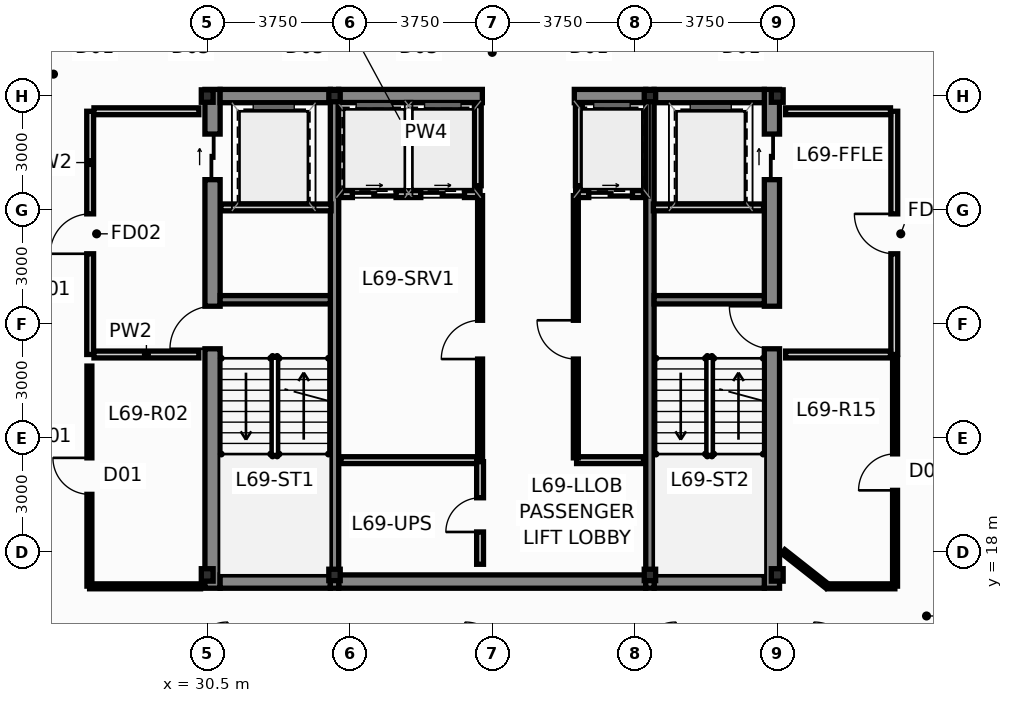
"""IFC4 building model, lengths in metres.
Left out: names, types, materials, properties, quantities, classifications, styles, units other than length and angle.
Written with IfcOpenShell. Run it as: python <this file> out.ifc"""

import sys

from ifc_helpers import new_model, si_unit, direction, frame, frame_2d, origin, origin_2d, place, context, subcontext, project, spatial, rectangle, hollow_rectangle, i_section, extrude, source, transform, mapped, element, fill, save


model = new_model("IFC4")
c1 = context("Model", 3, precision=1e-05, world=origin(), true_north=direction((0.0, 1.0)))
c2 = subcontext(c1, "Body", "Model", "MODEL_VIEW")
j1 = project(units=[si_unit("LENGTHUNIT", "METRE"), si_unit("PLANEANGLEUNIT", "RADIAN")], contexts=[c1])
p1 = place(None, origin())
s1 = spatial("IfcSite", under=j1, at=p1, CompositionType="ELEMENT")
p2 = place(p1, origin())
s2 = spatial("IfcBuilding", under=s1, at=p2, CompositionType="ELEMENT")
p3 = place(p2, frame((0.0, 0.0, 262.7)))
s3 = spatial("IfcBuildingStorey", under=s2, at=p3, CompositionType="ELEMENT", Elevation=262.7)
m1 = source(origin(), c2, "Body", "SweptSolid", [
    extrude(i_section(OverallWidth=0.311, OverallDepth=0.327, WebThickness=0.016, FlangeThickness=0.025, at=origin_2d()), origin(), (0.0, 0.0, 1.0), 3.65),
])
for number, where, z_axis, x_axis in (
    (1, (30.5, 17.4, 0.0), (0.0, 0.0, 1.0), (1.0, 0.0, 0.0)),
    (2, (45.5, 17.4, 0.0), (0.0, 0.0, 1.0), (1.0, 0.0, 0.0)),
    (3, (45.5, 30.0, 0.0), (0.0, 0.0, 1.0), (1.0, 0.0, 0.0)),
    (4, (30.5, 30.0, 0.0), (0.0, 0.0, 1.0), (1.0, 0.0, 0.0)),
):
    element("IfcColumn", number, at=place(p3, frame(where, z_axis=z_axis, x_axis=x_axis)), inside=s3, PredefinedType="COLUMN", context=c2, shape_type="MappedRepresentation", body=[
        mapped(m1, transform((0.0, 0.0, 0.0), scale=1.0)),
    ])
m2 = source(origin(), c2, "Body", "SweptSolid", [
    extrude(hollow_rectangle(XDim=0.3, YDim=0.3, WallThickness=0.012, at=origin_2d()), origin(), (0.0, 0.0, 1.0), 3.65),
])
for number, where, z_axis, x_axis in (
    (5, (33.85, 17.4, 0.0), (0.0, 0.0, 1.0), (1.0, 0.0, 0.0)),
    (6, (42.15, 17.4, 0.0), (0.0, 0.0, 1.0), (1.0, 0.0, 0.0)),
    (7, (33.85, 30.0, 0.0), (0.0, 0.0, 1.0), (1.0, 0.0, 0.0)),
    (8, (42.15, 30.0, 0.0), (0.0, 0.0, 1.0), (1.0, 0.0, 0.0)),
):
    element("IfcColumn", number, at=place(p3, frame(where, z_axis=z_axis, x_axis=x_axis)), inside=s3, PredefinedType="COLUMN", context=c2, shape_type="MappedRepresentation", body=[
        mapped(m2, transform((0.0, 0.0, 0.0), scale=1.0)),
    ])
p4 = place(p3, frame((30.64, 17.05, 0.0), z_axis=(0.0, 0.0, 1.0), x_axis=(0.0, 1.0, 0.0)))
e9 = element("IfcWall", 9, at=p4, inside=s3, PredefinedType="SHEAR", context=c2, shape_type="SweptSolid", body=[
    extrude(rectangle(XDim=13.125, YDim=0.4, at=frame_2d((6.562, 0.0))), origin(), (0.0, 0.0, 1.0), 3.65),
])
p5 = place(p4, frame((6.3, 0.0, 0.0)))
e10 = element("IfcOpeningElement", 10, at=p5, cuts=e9, PredefinedType="OPENING", context=c2, shape_type="SweptSolid", body=[
    extrude(rectangle(XDim=1.12, YDim=2.15, at=frame_2d((0.56, 1.075))), frame((0.0, 0.212, 0.0), z_axis=(0.0, -1.0, 0.0), x_axis=(1.0, 0.0, 0.0)), (0.0, 0.0, 1.0), 0.424),
])
p6 = place(p4, frame((10.75, 0.0, 0.0)))
e11 = element("IfcOpeningElement", 11, at=p6, cuts=e9, PredefinedType="OPENING", context=c2, shape_type="SweptSolid", body=[
    extrude(rectangle(XDim=1.2, YDim=2.2, at=frame_2d((0.6, 1.1))), frame((0.0, 0.212, 0.0), z_axis=(0.0, -1.0, 0.0), x_axis=(1.0, 0.0, 0.0)), (0.0, 0.0, 1.0), 0.424),
])
p7 = place(p3, frame((45.36, 17.05, 0.0), z_axis=(0.0, 0.0, 1.0), x_axis=(0.0, 1.0, 0.0)))
e12 = element("IfcWall", 12, at=p7, inside=s3, PredefinedType="SHEAR", context=c2, shape_type="SweptSolid", body=[
    extrude(rectangle(XDim=13.125, YDim=0.4, at=frame_2d((6.562, 0.0))), origin(), (0.0, 0.0, 1.0), 3.65),
])
p8 = place(p7, frame((6.3, 0.0, 0.0)))
e13 = element("IfcOpeningElement", 13, at=p8, cuts=e12, PredefinedType="OPENING", context=c2, shape_type="SweptSolid", body=[
    extrude(rectangle(XDim=1.12, YDim=2.15, at=frame_2d((0.56, 1.075))), frame((0.0, 0.212, 0.0), z_axis=(0.0, -1.0, 0.0), x_axis=(1.0, 0.0, 0.0)), (0.0, 0.0, 1.0), 0.424),
])
p9 = place(p7, frame((10.75, 0.0, 0.0)))
e14 = element("IfcOpeningElement", 14, at=p9, cuts=e12, PredefinedType="OPENING", context=c2, shape_type="SweptSolid", body=[
    extrude(rectangle(XDim=1.2, YDim=2.2, at=frame_2d((0.6, 1.1))), frame((0.0, 0.212, 0.0), z_axis=(0.0, -1.0, 0.0), x_axis=(1.0, 0.0, 0.0)), (0.0, 0.0, 1.0), 0.424),
])
p10 = place(p3, frame((30.84, 17.225, 0.0), z_axis=(0.0, 0.0, 1.0), x_axis=(1.0, 0.0, 0.0)))
e15 = element("IfcWall", 15, at=p10, inside=s3, PredefinedType="SHEAR", context=c2, shape_type="SweptSolid", body=[
    extrude(rectangle(XDim=2.9, YDim=0.35, at=frame_2d((1.45, 0.0))), origin(), (0.0, 0.0, 1.0), 3.65),
])
p11 = place(p3, frame((33.96, 17.225, 0.0), z_axis=(0.0, 0.0, 1.0), x_axis=(1.0, 0.0, 0.0)))
e16 = element("IfcWall", 16, at=p11, inside=s3, PredefinedType="SHEAR", context=c2, shape_type="SweptSolid", body=[
    extrude(rectangle(XDim=8.08, YDim=0.35, at=frame_2d((4.04, 0.0))), origin(), (0.0, 0.0, 1.0), 3.65),
])
for number, where, z_axis, x_axis in (
    (17, (42.26, 17.225, 0.0), (0.0, 0.0, 1.0), (1.0, 0.0, 0.0)),
    (18, (30.84, 30.0, 0.0), (0.0, 0.0, 1.0), (1.0, 0.0, 0.0)),
):
    element("IfcWall", number, at=place(p3, frame(where, z_axis=z_axis, x_axis=x_axis)), inside=s3, PredefinedType="SHEAR", context=c2, shape_type="SweptSolid", body=[
        extrude(rectangle(XDim=2.9, YDim=0.35, at=frame_2d((1.45, 0.0))), origin(), (0.0, 0.0, 1.0), 3.65),
    ])
p12 = place(p3, frame((33.96, 30.0, 0.0), z_axis=(0.0, 0.0, 1.0), x_axis=(1.0, 0.0, 0.0)))
e19 = element("IfcWall", 19, at=p12, inside=s3, PredefinedType="SHEAR", context=c2, shape_type="SweptSolid", body=[
    extrude(rectangle(XDim=3.78, YDim=0.35, at=frame_2d((1.89, 0.0))), origin(), (0.0, 0.0, 1.0), 3.65),
])
p13 = place(p3, frame((40.16, 30.0, 0.0), z_axis=(0.0, 0.0, 1.0), x_axis=(1.0, 0.0, 0.0)))
e20 = element("IfcWall", 20, at=p13, inside=s3, PredefinedType="SHEAR", context=c2, shape_type="SweptSolid", body=[
    extrude(rectangle(XDim=1.88, YDim=0.35, at=frame_2d((0.94, 0.0))), origin(), (0.0, 0.0, 1.0), 3.65),
])
p14 = place(p3, frame((42.26, 30.0, 0.0), z_axis=(0.0, 0.0, 1.0), x_axis=(1.0, 0.0, 0.0)))
e21 = element("IfcWall", 21, at=p14, inside=s3, PredefinedType="SHEAR", context=c2, shape_type="SweptSolid", body=[
    extrude(rectangle(XDim=2.9, YDim=0.35, at=frame_2d((1.45, 0.0))), origin(), (0.0, 0.0, 1.0), 3.65),
])
for number, where, z_axis, x_axis in (
    (22, (33.85, 17.05, 0.0), (0.0, 0.0, 1.0), (0.0, 1.0, 0.0)),
    (23, (42.15, 17.05, 0.0), (0.0, 0.0, 1.0), (0.0, 1.0, 0.0)),
):
    element("IfcWall", number, at=place(p3, frame(where, z_axis=z_axis, x_axis=x_axis)), inside=s3, PredefinedType="SHEAR", context=c2, shape_type="SweptSolid", body=[
        extrude(rectangle(XDim=13.125, YDim=0.22, at=frame_2d((6.562, 0.0))), origin(), (0.0, 0.0, 1.0), 3.65),
    ])
for number, where, z_axis, x_axis in (
    (24, (30.84, 24.64, 0.0), (0.0, 0.0, 1.0), (1.0, 0.0, 0.0)),
    (25, (42.26, 24.64, 0.0), (0.0, 0.0, 1.0), (1.0, 0.0, 0.0)),
):
    element("IfcWall", number, at=place(p3, frame(where, z_axis=z_axis, x_axis=x_axis)), inside=s3, PredefinedType="SHEAR", context=c2, shape_type="SweptSolid", body=[
        extrude(rectangle(XDim=2.9, YDim=0.22, at=frame_2d((1.45, 0.0))), origin(), (0.0, 0.0, 1.0), 3.65),
    ])
p15 = place(p3, frame((34.02, 27.42, 0.0), z_axis=(0.0, 0.0, 1.0), x_axis=(1.0, 0.0, 0.0)))
e26 = element("IfcWall", 26, at=p15, inside=s3, PredefinedType="PARTITIONING", context=c2, shape_type="SweptSolid", body=[
    extrude(rectangle(XDim=3.66, YDim=0.18, at=frame_2d((1.83, 0.0))), origin(), (0.0, 0.0, 1.0), 3.4),
])
p16 = place(p15, frame((0.3, 0.0, 0.0)))
e27 = element("IfcOpeningElement", 27, at=p16, cuts=e26, PredefinedType="OPENING", context=c2, shape_type="SweptSolid", body=[
    extrude(rectangle(XDim=1.15, YDim=2.2, at=frame_2d((0.575, 1.1))), frame((0.0, 0.102, 0.0), z_axis=(0.0, -1.0, 0.0), x_axis=(1.0, 0.0, 0.0)), (0.0, 0.0, 1.0), 0.204),
])
p17 = place(p15, frame((2.1, 0.0, 0.0)))
e28 = element("IfcOpeningElement", 28, at=p17, cuts=e26, PredefinedType="OPENING", context=c2, shape_type="SweptSolid", body=[
    extrude(rectangle(XDim=1.15, YDim=2.2, at=frame_2d((0.575, 1.1))), frame((0.0, 0.102, 0.0), z_axis=(0.0, -1.0, 0.0), x_axis=(1.0, 0.0, 0.0)), (0.0, 0.0, 1.0), 0.204),
])
p18 = place(p3, frame((40.22, 27.42, 0.0), z_axis=(0.0, 0.0, 1.0), x_axis=(1.0, 0.0, 0.0)))
e29 = element("IfcWall", 29, at=p18, inside=s3, PredefinedType="PARTITIONING", context=c2, shape_type="SweptSolid", body=[
    extrude(rectangle(XDim=1.76, YDim=0.18, at=frame_2d((0.88, 0.0))), origin(), (0.0, 0.0, 1.0), 3.4),
])
p19 = place(p18, frame((0.32, 0.0, 0.0)))
e30 = element("IfcOpeningElement", 30, at=p19, cuts=e29, PredefinedType="OPENING", context=c2, shape_type="SweptSolid", body=[
    extrude(rectangle(XDim=1.15, YDim=2.2, at=frame_2d((0.575, 1.1))), frame((0.0, 0.102, 0.0), z_axis=(0.0, -1.0, 0.0), x_axis=(1.0, 0.0, 0.0)), (0.0, 0.0, 1.0), 0.204),
])
for number, where, z_axis, x_axis in (
    (31, (37.62, 27.64, 0.0), (0.0, 0.0, 1.0), (0.0, 1.0, 0.0)),
    (32, (40.28, 27.64, 0.0), (0.0, 0.0, 1.0), (0.0, 1.0, 0.0)),
):
    element("IfcWall", number, at=place(p3, frame(where, z_axis=z_axis, x_axis=x_axis)), inside=s3, PredefinedType="PARTITIONING", context=c2, shape_type="SweptSolid", body=[
        extrude(rectangle(XDim=2.11, YDim=0.18, at=frame_2d((1.055, 0.0))), origin(), (0.0, 0.0, 1.0), 3.4),
    ])
p20 = place(p3, frame((27.42, 23.2, 0.0), z_axis=(0.0, 0.0, 1.0), x_axis=(0.0, 1.0, 0.0)))
e33 = element("IfcWall", 33, at=p20, inside=s3, PredefinedType="PARTITIONING", context=c2, shape_type="SweptSolid", body=[
    extrude(rectangle(XDim=6.4, YDim=0.18, at=frame_2d((3.2, 0.0))), origin(), (0.0, 0.0, 1.0), 3.085),
])
p21 = place(p20, frame((2.65, 0.0, 0.0)))
e34 = element("IfcOpeningElement", 34, at=p21, cuts=e33, PredefinedType="OPENING", context=c2, shape_type="SweptSolid", body=[
    extrude(rectangle(XDim=1.05, YDim=2.15, at=frame_2d((0.525, 1.075))), frame((0.0, 0.102, 0.0), z_axis=(0.0, -1.0, 0.0), x_axis=(1.0, 0.0, 0.0)), (0.0, 0.0, 1.0), 0.204),
])
for number, where, z_axis, x_axis in (
    (35, (27.52, 23.2, 0.0), (0.0, 0.0, 1.0), (1.0, 0.0, 0.0)),
    (36, (27.52, 29.6, 0.0), (0.0, 0.0, 1.0), (1.0, 0.0, 0.0)),
):
    element("IfcWall", number, at=place(p3, frame(where, z_axis=z_axis, x_axis=x_axis)), inside=s3, PredefinedType="PARTITIONING", context=c2, shape_type="SweptSolid", body=[
        extrude(rectangle(XDim=2.76, YDim=0.18, at=frame_2d((1.38, 0.0))), origin(), (0.0, 0.0, 1.0), 3.4),
    ])
p22 = place(p3, frame((48.58, 23.2, 0.0), z_axis=(0.0, 0.0, 1.0), x_axis=(0.0, 1.0, 0.0)))
e37 = element("IfcWall", 37, at=p22, inside=s3, PredefinedType="PARTITIONING", context=c2, shape_type="SweptSolid", body=[
    extrude(rectangle(XDim=6.4, YDim=0.18, at=frame_2d((3.2, 0.0))), origin(), (0.0, 0.0, 1.0), 3.085),
])
p23 = place(p22, frame((2.65, 0.0, 0.0)))
e38 = element("IfcOpeningElement", 38, at=p23, cuts=e37, PredefinedType="OPENING", context=c2, shape_type="SweptSolid", body=[
    extrude(rectangle(XDim=1.05, YDim=2.15, at=frame_2d((0.525, 1.075))), frame((0.0, 0.102, 0.0), z_axis=(0.0, -1.0, 0.0), x_axis=(1.0, 0.0, 0.0)), (0.0, 0.0, 1.0), 0.204),
])
for number, where, z_axis, x_axis in (
    (39, (45.72, 23.2, 0.0), (0.0, 0.0, 1.0), (1.0, 0.0, 0.0)),
    (40, (45.72, 29.6, 0.0), (0.0, 0.0, 1.0), (1.0, 0.0, 0.0)),
):
    element("IfcWall", number, at=place(p3, frame(where, z_axis=z_axis, x_axis=x_axis)), inside=s3, PredefinedType="PARTITIONING", context=c2, shape_type="SweptSolid", body=[
        extrude(rectangle(XDim=2.76, YDim=0.18, at=frame_2d((1.38, 0.0))), origin(), (0.0, 0.0, 1.0), 3.4),
    ])
for number, where, z_axis, x_axis in (
    (41, (30.86, 27.07, 0.0), (0.0, 0.0, 1.0), (1.0, 0.0, 0.0)),
    (42, (42.24, 27.07, 0.0), (0.0, 0.0, 1.0), (1.0, 0.0, 0.0)),
):
    element("IfcWall", number, at=place(p3, frame(where, z_axis=z_axis, x_axis=x_axis)), inside=s3, PredefinedType="PARTITIONING", context=c2, shape_type="SweptSolid", body=[
        extrude(rectangle(XDim=2.9, YDim=0.18, at=frame_2d((1.45, 0.0))), origin(), (0.0, 0.0, 1.0), 3.4),
    ])
p24 = place(p3, frame((34.02, 20.42, 0.0), z_axis=(0.0, 0.0, 1.0), x_axis=(1.0, 0.0, 0.0)))
e43 = element("IfcWall", 43, at=p24, inside=s3, PredefinedType="PARTITIONING", context=c2, shape_type="SweptSolid", body=[
    extrude(rectangle(XDim=3.64, YDim=0.18, at=frame_2d((1.82, 0.0))), origin(), (0.0, 0.0, 1.0), 3.4),
])
p25 = place(p3, frame((40.22, 20.42, 0.0), z_axis=(0.0, 0.0, 1.0), x_axis=(1.0, 0.0, 0.0)))
e44 = element("IfcWall", 44, at=p25, inside=s3, PredefinedType="PARTITIONING", context=c2, shape_type="SweptSolid", body=[
    extrude(rectangle(XDim=1.76, YDim=0.18, at=frame_2d((0.88, 0.0))), origin(), (0.0, 0.0, 1.0), 3.4),
])
p26 = place(p3, frame((37.68, 20.48, 0.0), z_axis=(0.0, 0.0, 1.0), x_axis=(0.0, 1.0, 0.0)))
e45 = element("IfcWall", 45, at=p26, inside=s3, PredefinedType="PARTITIONING", context=c2, shape_type="SweptSolid", body=[
    extrude(rectangle(XDim=6.9, YDim=0.13, at=frame_2d((3.45, 0.0))), origin(), (0.0, 0.0, 1.0), 3.4),
])
p27 = place(p26, frame((2.6, 0.0, 0.0)))
e46 = element("IfcOpeningElement", 46, at=p27, cuts=e45, PredefinedType="OPENING", context=c2, shape_type="SweptSolid", body=[
    extrude(rectangle(XDim=1.02, YDim=2.15, at=frame_2d((0.51, 1.075))), frame((0.0, 0.077, 0.0), z_axis=(0.0, -1.0, 0.0), x_axis=(1.0, 0.0, 0.0)), (0.0, 0.0, 1.0), 0.154),
])
p28 = place(p3, frame((40.2, 20.48, 0.0), z_axis=(0.0, 0.0, 1.0), x_axis=(0.0, 1.0, 0.0)))
e47 = element("IfcWall", 47, at=p28, inside=s3, PredefinedType="PARTITIONING", context=c2, shape_type="SweptSolid", body=[
    extrude(rectangle(XDim=6.9, YDim=0.13, at=frame_2d((3.45, 0.0))), origin(), (0.0, 0.0, 1.0), 3.4),
])
p29 = place(p28, frame((2.6, 0.0, 0.0)))
e48 = element("IfcOpeningElement", 48, at=p29, cuts=e47, PredefinedType="OPENING", context=c2, shape_type="SweptSolid", body=[
    extrude(rectangle(XDim=1.02, YDim=2.15, at=frame_2d((0.51, 1.075))), frame((0.0, 0.077, 0.0), z_axis=(0.0, -1.0, 0.0), x_axis=(1.0, 0.0, 0.0)), (0.0, 0.0, 1.0), 0.154),
])
p30 = place(p3, frame((37.68, 17.68, 0.0), z_axis=(0.0, 0.0, 1.0), x_axis=(0.0, 1.0, 0.0)))
e49 = element("IfcWall", 49, at=p30, inside=s3, PredefinedType="PARTITIONING", context=c2, shape_type="SweptSolid", body=[
    extrude(rectangle(XDim=2.7, YDim=0.18, at=frame_2d((1.35, 0.0))), origin(), (0.0, 0.0, 1.0), 3.4),
])
p31 = place(p30, frame((0.85, 0.0, 0.0)))
e50 = element("IfcOpeningElement", 50, at=p31, cuts=e49, PredefinedType="OPENING", context=c2, shape_type="SweptSolid", body=[
    extrude(rectangle(XDim=0.9, YDim=2.1, at=frame_2d((0.45, 1.05))), frame((0.0, 0.102, 0.0), z_axis=(0.0, -1.0, 0.0), x_axis=(1.0, 0.0, 0.0)), (0.0, 0.0, 1.0), 0.204),
])
p32 = place(p3, frame((48.6, 17.105, 0.0), z_axis=(0.0, 0.0, 1.0), x_axis=(0.0, 1.0, 0.0)))
e51 = element("IfcWall", 51, at=p32, inside=s3, PredefinedType="PARTITIONING", context=c2, shape_type="SweptSolid", body=[
    extrude(rectangle(XDim=6.0, YDim=0.13, at=frame_2d((3.0, 0.0))), origin(), (0.0, 0.0, 1.0), 3.085),
])
p33 = place(p32, frame((2.52, 0.0, 0.0)))
e52 = element("IfcOpeningElement", 52, at=p33, cuts=e51, PredefinedType="OPENING", context=c2, shape_type="SweptSolid", body=[
    extrude(rectangle(XDim=0.96, YDim=2.15, at=frame_2d((0.48, 1.075))), frame((0.0, 0.077, 0.0), z_axis=(0.0, -1.0, 0.0), x_axis=(1.0, 0.0, 0.0)), (0.0, 0.0, 1.0), 0.154),
])
p34 = place(p3, frame((27.4, 17.105, 0.0), z_axis=(0.0, 0.0, 1.0), x_axis=(0.0, 1.0, 0.0)))
e53 = element("IfcWall", 53, at=p34, inside=s3, PredefinedType="PARTITIONING", context=c2, shape_type="SweptSolid", body=[
    extrude(rectangle(XDim=5.79, YDim=0.13, at=frame_2d((2.895, 0.0))), origin(), (0.0, 0.0, 1.0), 3.085),
])
p35 = place(p34, frame((2.415, 0.0, 0.0)))
e54 = element("IfcOpeningElement", 54, at=p35, cuts=e53, PredefinedType="OPENING", context=c2, shape_type="SweptSolid", body=[
    extrude(rectangle(XDim=0.96, YDim=2.15, at=frame_2d((0.48, 1.075))), frame((0.0, 0.077, 0.0), z_axis=(0.0, -1.0, 0.0), x_axis=(1.0, 0.0, 0.0)), (0.0, 0.0, 1.0), 0.154),
])
p36 = place(p3, frame((30.325, 17.1, 0.0), z_axis=(0.0, 0.0, 1.0), x_axis=(-1.0, 0.0, 0.0)))
e55 = element("IfcWall", 55, at=p36, inside=s3, PredefinedType="PARTITIONING", context=c2, shape_type="SweptSolid", body=[
    extrude(rectangle(XDim=2.92, YDim=0.13, at=frame_2d((1.46, 0.0))), origin(), (0.0, 0.0, 1.0), 2.985),
])
p37 = place(p3, frame((46.825, 17.1, 0.0), z_axis=(0.0, 0.0, 1.0), x_axis=(1.0, 0.0, 0.0)))
e56 = element("IfcWall", 56, at=p37, inside=s3, PredefinedType="PARTITIONING", context=c2, shape_type="SweptSolid", body=[
    extrude(rectangle(XDim=1.77, YDim=0.13, at=frame_2d((0.885, 0.0))), origin(), (0.0, 0.0, 1.0), 2.985),
])
p38 = place(p3, frame((46.816, 17.103, 0.0), z_axis=(0.0, 0.0, 1.0), x_axis=(-0.785713874632, 0.618590096276, 0.0)))
e57 = element("IfcWall", 57, at=p38, inside=s3, PredefinedType="PARTITIONING", context=c2, shape_type="SweptSolid", body=[
    extrude(rectangle(XDim=1.472, YDim=0.13, at=frame_2d((0.736, 0.0))), origin(), (0.0, 0.0, 1.0), 3.4),
])
p39 = place(p5, origin())
e58 = element("IfcDoor", 58, at=p39, inside=s3, OperationType="SINGLE_SWING_LEFT", PredefinedType="DOOR", context=c2, shape_type="SweptSolid", body=[
    extrude(rectangle(XDim=1.12, YDim=2.15, at=frame_2d((0.56, 1.075))), frame((0.0, 0.025, 0.0), z_axis=(0.0, -1.0, 0.0), x_axis=(1.0, 0.0, 0.0)), (0.0, 0.0, 1.0), 0.05),
])
fill(e10, e58)
p40 = place(p6, origin())
e59 = element("IfcDoor", 59, at=p40, inside=s3, OperationType="SLIDING_TO_LEFT", PredefinedType="DOOR", context=c2, shape_type="SweptSolid", body=[
    extrude(rectangle(XDim=1.2, YDim=2.2, at=frame_2d((0.6, 1.1))), frame((0.0, 0.025, 0.0), z_axis=(0.0, -1.0, 0.0), x_axis=(1.0, 0.0, 0.0)), (0.0, 0.0, 1.0), 0.05),
])
fill(e11, e59)
p41 = place(p8, origin())
e60 = element("IfcDoor", 60, at=p41, inside=s3, OperationType="SINGLE_SWING_RIGHT", PredefinedType="DOOR", context=c2, shape_type="SweptSolid", body=[
    extrude(rectangle(XDim=1.12, YDim=2.15, at=frame_2d((0.56, 1.075))), frame((0.0, 0.025, 0.0), z_axis=(0.0, -1.0, 0.0), x_axis=(1.0, 0.0, 0.0)), (0.0, 0.0, 1.0), 0.05),
])
fill(e13, e60)
p42 = place(p9, origin())
e61 = element("IfcDoor", 61, at=p42, inside=s3, OperationType="SLIDING_TO_RIGHT", PredefinedType="DOOR", context=c2, shape_type="SweptSolid", body=[
    extrude(rectangle(XDim=1.2, YDim=2.2, at=frame_2d((0.6, 1.1))), frame((0.0, 0.025, 0.0), z_axis=(0.0, -1.0, 0.0), x_axis=(1.0, 0.0, 0.0)), (0.0, 0.0, 1.0), 0.05),
])
fill(e14, e61)
p43 = place(p16, origin())
e62 = element("IfcDoor", 62, at=p43, inside=s3, OperationType="SLIDING_TO_RIGHT", PredefinedType="DOOR", context=c2, shape_type="SweptSolid", body=[
    extrude(rectangle(XDim=1.15, YDim=2.2, at=frame_2d((0.575, 1.1))), frame((0.0, 0.025, 0.0), z_axis=(0.0, -1.0, 0.0), x_axis=(1.0, 0.0, 0.0)), (0.0, 0.0, 1.0), 0.05),
])
fill(e27, e62)
p44 = place(p17, origin())
e63 = element("IfcDoor", 63, at=p44, inside=s3, OperationType="SLIDING_TO_LEFT", PredefinedType="DOOR", context=c2, shape_type="SweptSolid", body=[
    extrude(rectangle(XDim=1.15, YDim=2.2, at=frame_2d((0.575, 1.1))), frame((0.0, 0.025, 0.0), z_axis=(0.0, -1.0, 0.0), x_axis=(1.0, 0.0, 0.0)), (0.0, 0.0, 1.0), 0.05),
])
fill(e28, e63)
p45 = place(p19, origin())
e64 = element("IfcDoor", 64, at=p45, inside=s3, OperationType="SLIDING_TO_RIGHT", PredefinedType="DOOR", context=c2, shape_type="SweptSolid", body=[
    extrude(rectangle(XDim=1.15, YDim=2.2, at=frame_2d((0.575, 1.1))), frame((0.0, 0.025, 0.0), z_axis=(0.0, -1.0, 0.0), x_axis=(1.0, 0.0, 0.0)), (0.0, 0.0, 1.0), 0.05),
])
fill(e30, e64)
p46 = place(p21, origin())
e65 = element("IfcDoor", 65, at=p46, inside=s3, OperationType="SINGLE_SWING_LEFT", PredefinedType="DOOR", context=c2, shape_type="SweptSolid", body=[
    extrude(rectangle(XDim=1.05, YDim=2.15, at=frame_2d((0.525, 1.075))), frame((0.0, 0.025, 0.0), z_axis=(0.0, -1.0, 0.0), x_axis=(1.0, 0.0, 0.0)), (0.0, 0.0, 1.0), 0.05),
])
fill(e34, e65)
p47 = place(p23, origin())
e66 = element("IfcDoor", 66, at=p47, inside=s3, OperationType="SINGLE_SWING_RIGHT", PredefinedType="DOOR", context=c2, shape_type="SweptSolid", body=[
    extrude(rectangle(XDim=1.05, YDim=2.15, at=frame_2d((0.525, 1.075))), frame((0.0, 0.025, 0.0), z_axis=(0.0, -1.0, 0.0), x_axis=(1.0, 0.0, 0.0)), (0.0, 0.0, 1.0), 0.05),
])
fill(e38, e66)
p48 = place(p27, origin())
e67 = element("IfcDoor", 67, at=p48, inside=s3, OperationType="SINGLE_SWING_LEFT", PredefinedType="DOOR", context=c2, shape_type="SweptSolid", body=[
    extrude(rectangle(XDim=1.02, YDim=2.15, at=frame_2d((0.51, 1.075))), frame((0.0, 0.025, 0.0), z_axis=(0.0, -1.0, 0.0), x_axis=(1.0, 0.0, 0.0)), (0.0, 0.0, 1.0), 0.05),
])
fill(e46, e67)
p49 = place(p29, origin())
e68 = element("IfcDoor", 68, at=p49, inside=s3, OperationType="SINGLE_SWING_RIGHT", PredefinedType="DOOR", context=c2, shape_type="SweptSolid", body=[
    extrude(rectangle(XDim=1.02, YDim=2.15, at=frame_2d((0.51, 1.075))), frame((0.0, 0.025, 0.0), z_axis=(0.0, -1.0, 0.0), x_axis=(1.0, 0.0, 0.0)), (0.0, 0.0, 1.0), 0.05),
])
fill(e48, e68)
p50 = place(p31, origin())
e69 = element("IfcDoor", 69, at=p50, inside=s3, OperationType="SINGLE_SWING_LEFT", PredefinedType="DOOR", context=c2, shape_type="SweptSolid", body=[
    extrude(rectangle(XDim=0.9, YDim=2.1, at=frame_2d((0.45, 1.05))), frame((0.0, 0.025, 0.0), z_axis=(0.0, -1.0, 0.0), x_axis=(1.0, 0.0, 0.0)), (0.0, 0.0, 1.0), 0.05),
])
fill(e50, e69)
p51 = place(p33, origin())
e70 = element("IfcDoor", 70, at=p51, inside=s3, OperationType="SINGLE_SWING_LEFT", PredefinedType="DOOR", context=c2, shape_type="SweptSolid", body=[
    extrude(rectangle(XDim=0.96, YDim=2.15, at=frame_2d((0.48, 1.075))), frame((0.0, 0.025, 0.0), z_axis=(0.0, -1.0, 0.0), x_axis=(1.0, 0.0, 0.0)), (0.0, 0.0, 1.0), 0.05),
])
fill(e52, e70)
p52 = place(p35, origin())
e71 = element("IfcDoor", 71, at=p52, inside=s3, OperationType="SINGLE_SWING_RIGHT", PredefinedType="DOOR", context=c2, shape_type="SweptSolid", body=[
    extrude(rectangle(XDim=0.96, YDim=2.15, at=frame_2d((0.48, 1.075))), frame((0.0, 0.025, 0.0), z_axis=(0.0, -1.0, 0.0), x_axis=(1.0, 0.0, 0.0)), (0.0, 0.0, 1.0), 0.05),
])
fill(e54, e71)
save(model, sys.argv[1])
